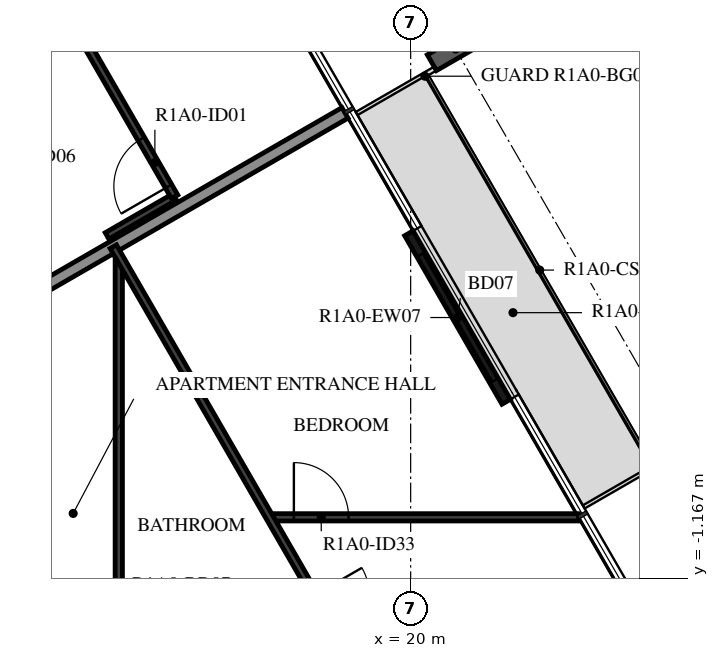
"""IFC4 building model, lengths in metres.
Left out: names, types, materials, properties, quantities, classifications, styles, units other than length and angle.
Written with IfcOpenShell. Run it as: python <this file> out.ifc"""

import sys

from ifc_helpers import new_model, si_unit, direction, frame, frame_2d, origin, origin_2d, place, context, subcontext, project, spatial, rectangle, i_section, extrude, element, fill, save


model = new_model("IFC4")
c1 = context("Model", 3, precision=1e-05, world=origin(), true_north=direction((0.0, 1.0)))
c2 = subcontext(c1, "Body", "Model", "MODEL_VIEW")
j1 = project(units=[si_unit("LENGTHUNIT", "METRE"), si_unit("PLANEANGLEUNIT", "RADIAN")], contexts=[c1])
p1 = place(None, origin())
s1 = spatial("IfcSite", under=j1, at=p1, CompositionType="ELEMENT")
p2 = place(p1, origin())
s2 = spatial("IfcBuilding", under=s1, at=p2, CompositionType="ELEMENT")
p3 = place(p2, frame((0.0, 0.0, 45.4)))
s3 = spatial("IfcBuildingStorey", under=s2, at=p3, CompositionType="ELEMENT", Elevation=45.4)
p4 = place(p3, frame((20.739, 7.539, -0.38), z_axis=(0.0, 0.0, 1.0), x_axis=(0.50000017485, -0.866025302835, 0.0)))
e1 = element("IfcColumn", 1, at=p4, inside=s3, PredefinedType="COLUMN", context=c2, shape_type="SweptSolid", body=[
    extrude(i_section(OverallWidth=0.3, OverallDepth=0.9, WebThickness=0.019, FlangeThickness=0.035, FilletRadius=0.03, at=origin_2d()), origin(), (0.0, 0.0, 1.0), 3.5),
])
p5 = place(p3, frame((21.571, 1.738, 0.0), z_axis=(0.0, 0.0, 1.0), x_axis=(-0.500028443584, 0.866008981251, 0.0)))
e2 = element("IfcWall", 2, at=p5, inside=s3, PredefinedType="STANDARD", context=c2, shape_type="SweptSolid", body=[
    extrude(rectangle(XDim=3.2, YDim=0.16, at=frame_2d((1.6, 0.0))), origin(), (0.0, 0.0, 1.0), 3.12),
])
p6 = place(p5, frame((0.4, 0.0, 0.0)))
e3 = element("IfcOpeningElement", 3, at=p6, cuts=e2, PredefinedType="OPENING", context=c2, shape_type="SweptSolid", body=[
    extrude(rectangle(XDim=2.4, YDim=2.4, at=frame_2d((1.2, 1.2))), frame((0.0, 0.09, 0.0), z_axis=(0.0, -1.0, 0.0), x_axis=(1.0, 0.0, 0.0)), (0.0, 0.0, 1.0), 0.18),
])
p7 = place(p3, frame((13.7, 3.476, 0.0), z_axis=(0.0, 0.0, 1.0), x_axis=(0.866013584312, 0.500020471368, 0.0)))
e4 = element("IfcWall", 4, at=p7, inside=s3, PredefinedType="STANDARD", context=c2, shape_type="SweptSolid", body=[
    extrude(rectangle(XDim=6.028, YDim=0.2, at=frame_2d((3.014, 0.0))), origin(), (0.0, 0.0, 1.0), 2.73),
])
p8 = place(p3, frame((15.007, 4.467, 0.0), z_axis=(0.0, 0.0, 1.0), x_axis=(0.86599869919, 0.500046250861, 0.0)))
e5 = element("IfcWall", 5, at=p8, inside=s3, PredefinedType="PARTITIONING", context=c2, shape_type="SweptSolid", body=[
    extrude(rectangle(XDim=1.284, YDim=0.12, at=frame_2d((0.642, 0.0))), origin(), (0.0, 0.0, 1.0), 3.12),
])
p9 = place(p3, frame((16.119, 5.109, 0.0), z_axis=(0.0, 0.0, 1.0), x_axis=(-0.499988222896, 0.866032203192, 0.0)))
e6 = element("IfcWall", 6, at=p9, inside=s3, PredefinedType="PARTITIONING", context=c2, shape_type="SweptSolid", body=[
    extrude(rectangle(XDim=4.4, YDim=0.12, at=frame_2d((2.2, 0.0))), origin(), (0.0, 0.0, 1.0), 3.12),
])
p10 = place(p9, frame((0.2, 0.0, 0.0)))
e7 = element("IfcOpeningElement", 7, at=p10, cuts=e6, PredefinedType="OPENING", context=c2, shape_type="SweptSolid", body=[
    extrude(rectangle(XDim=0.9, YDim=2.1, at=frame_2d((0.45, 1.05))), frame((0.0, 0.07, 0.0), z_axis=(0.0, -1.0, 0.0), x_axis=(1.0, 0.0, 0.0)), (0.0, 0.0, 1.0), 0.14),
])
p11 = place(p3, frame((15.2, -4.073, 0.0), z_axis=(0.0, 0.0, 1.0), x_axis=(0.0, 1.0, 0.0)))
e8 = element("IfcWall", 8, at=p11, inside=s3, PredefinedType="PARTITIONING", context=c2, shape_type="SweptSolid", body=[
    extrude(rectangle(XDim=8.146, YDim=0.12, at=frame_2d((4.073, 0.0))), origin(), (0.0, 0.0, 1.0), 3.12),
])
p12 = place(p11, frame((1.357, 0.0, 0.0)))
e9 = element("IfcOpeningElement", 9, at=p12, cuts=e8, PredefinedType="OPENING", context=c2, shape_type="SweptSolid", body=[
    extrude(rectangle(XDim=0.8, YDim=2.1, at=frame_2d((0.4, 1.05))), frame((0.0, 0.07, 0.0), z_axis=(0.0, -1.0, 0.0), x_axis=(1.0, 0.0, 0.0)), (0.0, 0.0, 1.0), 0.14),
])
p13 = place(p3, frame((17.679, -0.162, 0.0), z_axis=(0.0, 0.0, 1.0), x_axis=(1.0, 0.0, 0.0)))
e10 = element("IfcWall", 10, at=p13, inside=s3, PredefinedType="PARTITIONING", context=c2, shape_type="SweptSolid", body=[
    extrude(rectangle(XDim=5.081, YDim=0.12, at=frame_2d((2.54, 0.0))), origin(), (0.0, 0.0, 1.0), 3.12),
])
p14 = place(p13, frame((0.4, 0.0, 0.0)))
e11 = element("IfcOpeningElement", 11, at=p14, cuts=e10, PredefinedType="OPENING", context=c2, shape_type="SweptSolid", body=[
    extrude(rectangle(XDim=0.9, YDim=2.1, at=frame_2d((0.45, 1.05))), frame((0.0, 0.07, 0.0), z_axis=(0.0, -1.0, 0.0), x_axis=(1.0, 0.0, 0.0)), (0.0, 0.0, 1.0), 0.14),
])
p15 = place(p3, frame((15.11, 4.289, 0.0), z_axis=(0.0, 0.0, 1.0), x_axis=(0.500001702147, -0.866024421047, 0.0)))
e12 = element("IfcWall", 12, at=p15, inside=s3, PredefinedType="PARTITIONING", context=c2, shape_type="SweptSolid", body=[
    extrude(rectangle(XDim=6.458, YDim=0.12, at=frame_2d((3.229, 0.0))), origin(), (0.0, 0.0, 1.0), 3.12),
])
p16 = place(p6, origin())
e13 = element("IfcDoor", 13, at=p16, inside=s3, OperationType="DOUBLE_DOOR_SLIDING", PredefinedType="DOOR", context=c2, shape_type="SweptSolid", body=[
    extrude(rectangle(XDim=2.4, YDim=2.4, at=frame_2d((1.2, 1.2))), frame((0.0, 0.025, 0.0), z_axis=(0.0, -1.0, 0.0), x_axis=(1.0, 0.0, 0.0)), (0.0, 0.0, 1.0), 0.05),
])
fill(e3, e13)
p17 = place(p10, origin())
e14 = element("IfcDoor", 14, at=p17, inside=s3, OperationType="SINGLE_SWING_LEFT", PredefinedType="DOOR", context=c2, shape_type="SweptSolid", body=[
    extrude(rectangle(XDim=0.9, YDim=2.1, at=frame_2d((0.45, 1.05))), frame((0.0, 0.025, 0.0), z_axis=(0.0, -1.0, 0.0), x_axis=(1.0, 0.0, 0.0)), (0.0, 0.0, 1.0), 0.05),
])
fill(e7, e14)
p18 = place(p14, origin())
e15 = element("IfcDoor", 15, at=p18, inside=s3, OperationType="SINGLE_SWING_LEFT", PredefinedType="DOOR", context=c2, shape_type="SweptSolid", body=[
    extrude(rectangle(XDim=0.9, YDim=2.1, at=frame_2d((0.45, 1.05))), frame((0.0, 0.025, 0.0), z_axis=(0.0, -1.0, 0.0), x_axis=(1.0, 0.0, 0.0)), (0.0, 0.0, 1.0), 0.05),
])
fill(e11, e15)
save(model, sys.argv[1])
